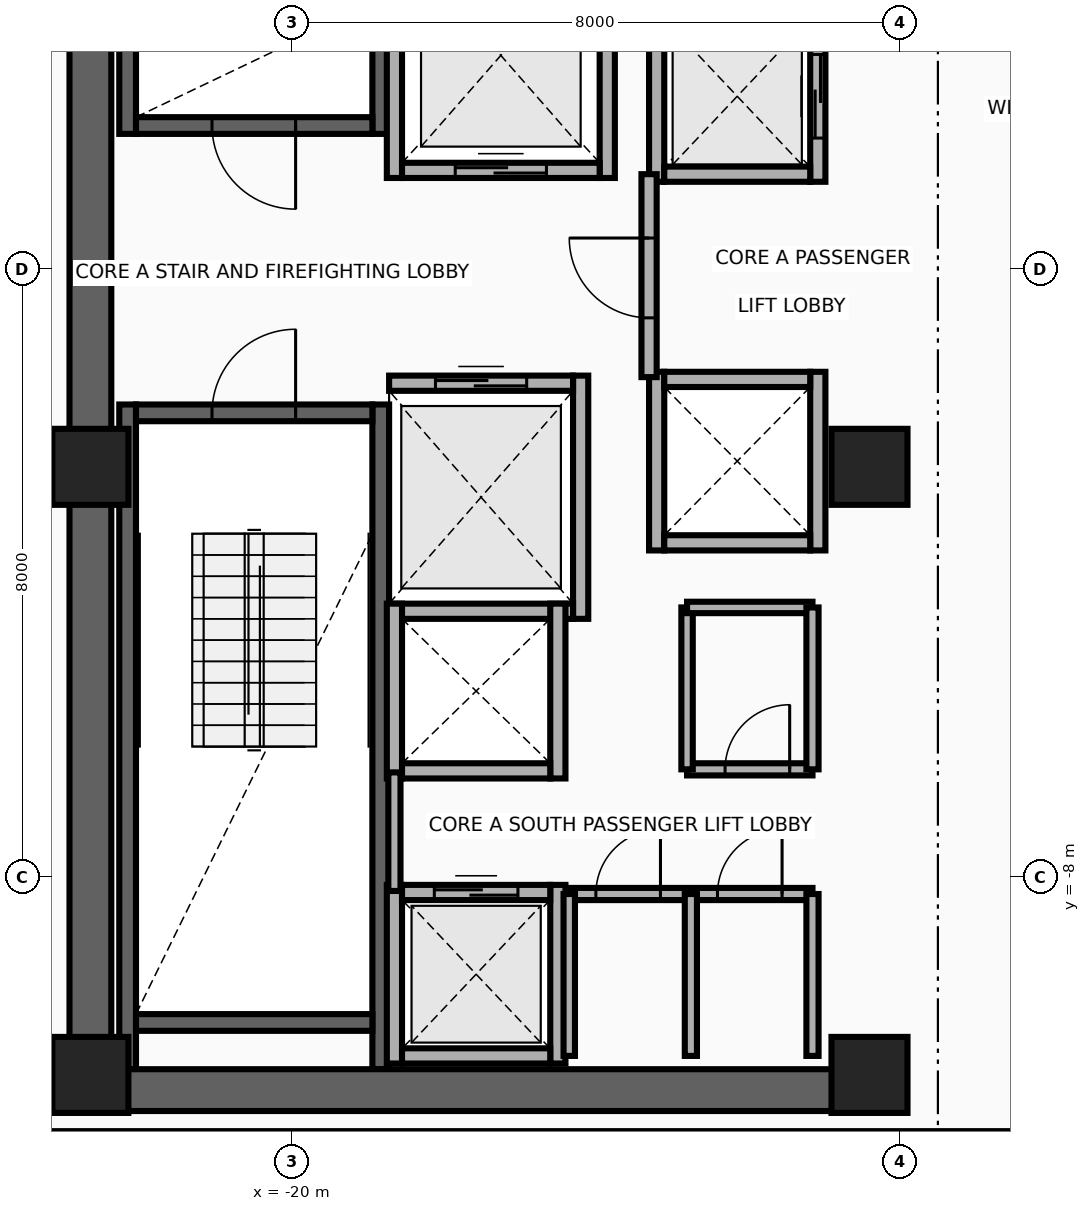
"""IFC4 building model, lengths in metres.
Left out: names, types, materials, properties, quantities, classifications, styles, units other than length and angle.
Written with IfcOpenShell. Run it as: python <this file> out.ifc"""

import sys

from ifc_helpers import new_model, si_unit, direction, frame, frame_2d, origin, origin_2d, place, context, subcontext, project, spatial, rectangle, extrude, source, transform, mapped, element, fill, save


model = new_model("IFC4")
c1 = context("Model", 3, precision=1e-05, world=origin(), true_north=direction((0.0, 1.0)))
c2 = subcontext(c1, "Body", "Model", "MODEL_VIEW")
j1 = project(units=[si_unit("LENGTHUNIT", "METRE"), si_unit("PLANEANGLEUNIT", "RADIAN")], contexts=[c1])
p1 = place(None, origin())
s1 = spatial("IfcSite", under=j1, at=p1, CompositionType="ELEMENT")
p2 = place(p1, origin())
s2 = spatial("IfcBuilding", under=s1, at=p2, CompositionType="ELEMENT")
p3 = place(p2, frame((0.0, 0.0, 184.45)))
s3 = spatial("IfcBuildingStorey", under=s2, at=p3, CompositionType="ELEMENT", Elevation=184.45)
for number, where, z_axis, x_axis in (
    (1, (-22.16, 1.78, 0.0), (0.0, 0.0, 1.0), (0.0, 1.0, 0.0)),
    (2, (-18.83, 1.78, 0.0), (0.0, 0.0, 1.0), (0.0, 1.0, 0.0)),
):
    element("IfcWall", number, at=place(p3, frame(where, z_axis=z_axis, x_axis=x_axis)), inside=s3, PredefinedType="SHEAR", context=c2, shape_type="SweptSolid", body=[
        extrude(rectangle(XDim=8.745, YDim=0.22, at=frame_2d((4.373, 0.0))), origin(), (0.0, 0.0, 1.0), 3.63),
    ])
p4 = place(p3, frame((-22.05, 1.89, 0.0), z_axis=(0.0, 0.0, 1.0), x_axis=(1.0, 0.0, 0.0)))
e3 = element("IfcWall", 3, at=p4, inside=s3, PredefinedType="SHEAR", context=c2, shape_type="SweptSolid", body=[
    extrude(rectangle(XDim=3.11, YDim=0.22, at=frame_2d((1.555, 0.0))), origin(), (0.0, 0.0, 1.0), 3.63),
])
p5 = place(p4, frame((1.0, 0.0, 0.0)))
e4 = element("IfcOpeningElement", 4, at=p5, cuts=e3, PredefinedType="OPENING", context=c2, shape_type="SweptSolid", body=[
    extrude(rectangle(XDim=1.1, YDim=2.15, at=frame_2d((0.55, 1.075))), frame((0.0, 0.125, 0.0), z_axis=(0.0, -1.0, 0.0), x_axis=(1.0, 0.0, 0.0)), (0.0, 0.0, 1.0), 0.25),
])
for number, where, z_axis, x_axis in (
    (5, (-22.16, -10.525, 0.0), (0.0, 0.0, 1.0), (0.0, 1.0, 0.0)),
    (6, (-18.83, -10.525, 0.0), (0.0, 0.0, 1.0), (0.0, 1.0, 0.0)),
):
    element("IfcWall", number, at=place(p3, frame(where, z_axis=z_axis, x_axis=x_axis)), inside=s3, PredefinedType="SHEAR", context=c2, shape_type="SweptSolid", body=[
        extrude(rectangle(XDim=8.745, YDim=0.22, at=frame_2d((4.373, 0.0))), origin(), (0.0, 0.0, 1.0), 3.63),
    ])
p6 = place(p3, frame((-22.05, -9.91, 0.0), z_axis=(0.0, 0.0, 1.0), x_axis=(1.0, 0.0, 0.0)))
e7 = element("IfcWall", 7, at=p6, inside=s3, PredefinedType="SHEAR", context=c2, shape_type="SweptSolid", body=[
    extrude(rectangle(XDim=3.11, YDim=0.22, at=frame_2d((1.555, 0.0))), origin(), (0.0, 0.0, 1.0), 3.63),
])
p7 = place(p3, frame((-22.05, -1.89, 0.0), z_axis=(0.0, 0.0, 1.0), x_axis=(1.0, 0.0, 0.0)))
e8 = element("IfcWall", 8, at=p7, inside=s3, PredefinedType="SHEAR", context=c2, shape_type="SweptSolid", body=[
    extrude(rectangle(XDim=3.11, YDim=0.22, at=frame_2d((1.555, 0.0))), origin(), (0.0, 0.0, 1.0), 3.63),
])
p8 = place(p7, frame((1.0, 0.0, 0.0)))
e9 = element("IfcOpeningElement", 9, at=p8, cuts=e8, PredefinedType="OPENING", context=c2, shape_type="SweptSolid", body=[
    extrude(rectangle(XDim=1.1, YDim=2.15, at=frame_2d((0.55, 1.075))), frame((0.0, 0.125, 0.0), z_axis=(0.0, -1.0, 0.0), x_axis=(1.0, 0.0, 0.0)), (0.0, 0.0, 1.0), 0.25),
])
p9 = place(p3, frame((-22.65, -11.075, 0.0), z_axis=(0.0, 0.0, 1.0), x_axis=(0.0, 1.0, 0.0)))
e10 = element("IfcWall", 10, at=p9, inside=s3, PredefinedType="SHEAR", context=c2, shape_type="SweptSolid", body=[
    extrude(rectangle(XDim=22.15, YDim=0.55, at=frame_2d((11.075, 0.0))), origin(), (0.0, 0.0, 1.0), 3.63),
])
p10 = place(p3, frame((-22.65, -10.8, 0.0), z_axis=(0.0, 0.0, 1.0), x_axis=(1.0, 0.0, 0.0)))
e11 = element("IfcWall", 11, at=p10, inside=s3, PredefinedType="SHEAR", context=c2, shape_type="SweptSolid", body=[
    extrude(rectangle(XDim=10.25, YDim=0.55, at=frame_2d((5.125, 0.0))), origin(), (0.0, 0.0, 1.0), 3.63),
])
m1 = source(origin(), c2, "Body", "SweptSolid", [
    extrude(rectangle(XDim=1.0, YDim=1.0, at=origin_2d()), origin(), (0.0, 0.0, 1.0), 3.95),
])
for number, where, z_axis, x_axis in (
    (12, (-22.65, -10.6, 0.0), (0.0, 0.0, 1.0), (1.0, 0.0, 0.0)),
    (13, (-12.4, -10.6, 0.0), (0.0, 0.0, 1.0), (1.0, 0.0, 0.0)),
    (14, (-22.65, -2.6, 0.0), (0.0, 0.0, 1.0), (1.0, 0.0, 0.0)),
    (15, (-12.4, -2.6, 0.0), (0.0, 0.0, 1.0), (1.0, 0.0, 0.0)),
):
    element("IfcColumn", number, at=place(p3, frame(where, z_axis=z_axis, x_axis=x_axis)), inside=s3, PredefinedType="COLUMN", context=c2, shape_type="MappedRepresentation", body=[
        mapped(m1, transform((0.0, 0.0, 0.0), x_axis=(1.0, 0.0, 0.0), y_axis=(0.0, 1.0, 0.0), z_axis=(0.0, 0.0, 1.0), scale=1.0)),
    ])
for number, where, z_axis, x_axis in (
    (16, (-18.65, 1.2, 0.0), (0.0, 0.0, 1.0), (0.0, 1.0, 0.0)),
    (17, (-15.85, 1.2, 0.0), (0.0, 0.0, 1.0), (0.0, 1.0, 0.0)),
):
    element("IfcWall", number, at=place(p3, frame(where, z_axis=z_axis, x_axis=x_axis)), inside=s3, PredefinedType="MOVABLE", context=c2, shape_type="SweptSolid", body=[
        extrude(rectangle(XDim=3.225, YDim=0.2, at=frame_2d((1.613, 0.0))), origin(), (0.0, 0.0, 1.0), 3.63),
    ])
p11 = place(p3, frame((-18.55, 1.3, 0.0), z_axis=(0.0, 0.0, 1.0), x_axis=(1.0, 0.0, 0.0)))
e18 = element("IfcWall", 18, at=p11, inside=s3, PredefinedType="MOVABLE", context=c2, shape_type="SweptSolid", body=[
    extrude(rectangle(XDim=2.6, YDim=0.2, at=frame_2d((1.3, 0.0))), origin(), (0.0, 0.0, 1.0), 3.63),
])
p12 = place(p11, frame((0.7, 0.0, 0.0)))
e19 = element("IfcOpeningElement", 19, at=p12, cuts=e18, PredefinedType="OPENING", context=c2, shape_type="SweptSolid", body=[
    extrude(rectangle(XDim=1.2, YDim=2.1, at=frame_2d((0.6, 1.05))), frame((0.0, 0.115, 0.0), z_axis=(0.0, -1.0, 0.0), x_axis=(1.0, 0.0, 0.0)), (0.0, 0.0, 1.0), 0.23),
])
p13 = place(p3, frame((-16.2, -4.6, 0.0), z_axis=(0.0, 0.0, 1.0), x_axis=(0.0, 1.0, 0.0)))
e20 = element("IfcWall", 20, at=p13, inside=s3, PredefinedType="MOVABLE", context=c2, shape_type="SweptSolid", body=[
    extrude(rectangle(XDim=3.2, YDim=0.2, at=frame_2d((1.6, 0.0))), origin(), (0.0, 0.0, 1.0), 3.63),
])
p14 = place(p3, frame((-18.72, -4.5, 0.0), z_axis=(0.0, 0.0, 1.0), x_axis=(1.0, 0.0, 0.0)))
e21 = element("IfcWall", 21, at=p14, inside=s3, PredefinedType="MOVABLE", context=c2, shape_type="SweptSolid", body=[
    extrude(rectangle(XDim=2.42, YDim=0.2, at=frame_2d((1.21, 0.0))), origin(), (0.0, 0.0, 1.0), 3.63),
])
p15 = place(p3, frame((-18.72, -1.5, 0.0), z_axis=(0.0, 0.0, 1.0), x_axis=(1.0, 0.0, 0.0)))
e22 = element("IfcWall", 22, at=p15, inside=s3, PredefinedType="MOVABLE", context=c2, shape_type="SweptSolid", body=[
    extrude(rectangle(XDim=2.42, YDim=0.2, at=frame_2d((1.21, 0.0))), origin(), (0.0, 0.0, 1.0), 3.63),
])
p16 = place(p15, frame((0.61, 0.0, 0.0)))
e23 = element("IfcOpeningElement", 23, at=p16, cuts=e22, PredefinedType="OPENING", context=c2, shape_type="SweptSolid", body=[
    extrude(rectangle(XDim=1.2, YDim=2.1, at=frame_2d((0.6, 1.05))), frame((0.0, 0.115, 0.0), z_axis=(0.0, -1.0, 0.0), x_axis=(1.0, 0.0, 0.0)), (0.0, 0.0, 1.0), 0.23),
])
for number, where, z_axis, x_axis in (
    (24, (-18.65, -10.45, 0.0), (0.0, 0.0, 1.0), (0.0, 1.0, 0.0)),
    (25, (-16.5, -10.45, 0.0), (0.0, 0.0, 1.0), (0.0, 1.0, 0.0)),
):
    element("IfcWall", number, at=place(p3, frame(where, z_axis=z_axis, x_axis=x_axis)), inside=s3, PredefinedType="MOVABLE", context=c2, shape_type="SweptSolid", body=[
        extrude(rectangle(XDim=2.35, YDim=0.2, at=frame_2d((1.175, 0.0))), origin(), (0.0, 0.0, 1.0), 2.665),
    ])
p17 = place(p3, frame((-18.55, -10.35, 0.0), z_axis=(0.0, 0.0, 1.0), x_axis=(1.0, 0.0, 0.0)))
e26 = element("IfcWall", 26, at=p17, inside=s3, PredefinedType="MOVABLE", context=c2, shape_type="SweptSolid", body=[
    extrude(rectangle(XDim=1.95, YDim=0.2, at=frame_2d((0.975, 0.0))), origin(), (0.0, 0.0, 1.0), 2.665),
])
p18 = place(p3, frame((-18.55, -8.2, 0.0), z_axis=(0.0, 0.0, 1.0), x_axis=(1.0, 0.0, 0.0)))
e27 = element("IfcWall", 27, at=p18, inside=s3, PredefinedType="MOVABLE", context=c2, shape_type="SweptSolid", body=[
    extrude(rectangle(XDim=1.95, YDim=0.2, at=frame_2d((0.975, 0.0))), origin(), (0.0, 0.0, 1.0), 3.63),
])
p19 = place(p18, frame((0.425, 0.0, 0.0)))
e28 = element("IfcOpeningElement", 28, at=p19, cuts=e27, PredefinedType="OPENING", context=c2, shape_type="SweptSolid", body=[
    extrude(rectangle(XDim=1.1, YDim=2.1, at=frame_2d((0.55, 1.05))), frame((0.0, 0.115, 0.0), z_axis=(0.0, -1.0, 0.0), x_axis=(1.0, 0.0, 0.0)), (0.0, 0.0, 1.0), 0.23),
])
p20 = place(p3, frame((-15.2, 1.15, 0.0), z_axis=(0.0, 0.0, 1.0), x_axis=(0.0, 1.0, 0.0)))
e29 = element("IfcWall", 29, at=p20, inside=s3, PredefinedType="MOVABLE", context=c2, shape_type="SweptSolid", body=[
    extrude(rectangle(XDim=2.25, YDim=0.2, at=frame_2d((1.125, 0.0))), origin(), (0.0, 0.0, 1.0), 3.63),
])
p21 = place(p3, frame((-13.08, 1.15, 0.0), z_axis=(0.0, 0.0, 1.0), x_axis=(0.0, 1.0, 0.0)))
e30 = element("IfcWall", 30, at=p21, inside=s3, PredefinedType="MOVABLE", context=c2, shape_type="SweptSolid", body=[
    extrude(rectangle(XDim=2.25, YDim=0.2, at=frame_2d((1.125, 0.0))), origin(), (0.0, 0.0, 1.0), 3.63),
])
p22 = place(p21, frame((0.575, 0.0, 0.0)))
e31 = element("IfcOpeningElement", 31, at=p22, cuts=e30, PredefinedType="OPENING", context=c2, shape_type="SweptSolid", body=[
    extrude(rectangle(XDim=1.1, YDim=2.1, at=frame_2d((0.55, 1.05))), frame((0.0, 0.115, 0.0), z_axis=(0.0, -1.0, 0.0), x_axis=(1.0, 0.0, 0.0)), (0.0, 0.0, 1.0), 0.23),
])
p23 = place(p3, frame((-15.1, 1.25, 0.0), z_axis=(0.0, 0.0, 1.0), x_axis=(1.0, 0.0, 0.0)))
e32 = element("IfcWall", 32, at=p23, inside=s3, PredefinedType="MOVABLE", context=c2, shape_type="SweptSolid", body=[
    extrude(rectangle(XDim=1.92, YDim=0.2, at=frame_2d((0.96, 0.0))), origin(), (0.0, 0.0, 1.0), 3.63),
])
for number, where, z_axis, x_axis in (
    (33, (-18.65, -6.7, 0.0), (0.0, 0.0, 1.0), (0.0, 1.0, 0.0)),
    (34, (-16.5, -6.7, 0.0), (0.0, 0.0, 1.0), (0.0, 1.0, 0.0)),
):
    element("IfcWall", number, at=place(p3, frame(where, z_axis=z_axis, x_axis=x_axis)), inside=s3, PredefinedType="MOVABLE", context=c2, shape_type="SweptSolid", body=[
        extrude(rectangle(XDim=2.3, YDim=0.2, at=frame_2d((1.15, 0.0))), origin(), (0.0, 0.0, 1.0), 3.63),
    ])
p24 = place(p3, frame((-18.55, -6.6, 0.0), z_axis=(0.0, 0.0, 1.0), x_axis=(1.0, 0.0, 0.0)))
e35 = element("IfcWall", 35, at=p24, inside=s3, PredefinedType="MOVABLE", context=c2, shape_type="SweptSolid", body=[
    extrude(rectangle(XDim=1.95, YDim=0.2, at=frame_2d((0.975, 0.0))), origin(), (0.0, 0.0, 1.0), 3.63),
])
for number, where, z_axis, x_axis in (
    (36, (-15.2, -3.7, 0.0), (0.0, 0.0, 1.0), (0.0, 1.0, 0.0)),
    (37, (-13.08, -3.7, 0.0), (0.0, 0.0, 1.0), (0.0, 1.0, 0.0)),
):
    element("IfcWall", number, at=place(p3, frame(where, z_axis=z_axis, x_axis=x_axis)), inside=s3, PredefinedType="MOVABLE", context=c2, shape_type="SweptSolid", body=[
        extrude(rectangle(XDim=2.35, YDim=0.2, at=frame_2d((1.175, 0.0))), origin(), (0.0, 0.0, 1.0), 3.63),
    ])
for number, where, z_axis, x_axis in (
    (38, (-15.1, -3.6, 0.0), (0.0, 0.0, 1.0), (1.0, 0.0, 0.0)),
    (39, (-15.1, -1.45, 0.0), (0.0, 0.0, 1.0), (1.0, 0.0, 0.0)),
):
    element("IfcWall", number, at=place(p3, frame(where, z_axis=z_axis, x_axis=x_axis)), inside=s3, PredefinedType="MOVABLE", context=c2, shape_type="SweptSolid", body=[
        extrude(rectangle(XDim=1.92, YDim=0.2, at=frame_2d((0.96, 0.0))), origin(), (0.0, 0.0, 1.0), 3.63),
    ])
p25 = place(p3, frame((-15.3, -1.42, 0.0), z_axis=(0.0, 0.0, 1.0), x_axis=(0.0, 1.0, 0.0)))
e40 = element("IfcWall", 40, at=p25, inside=s3, PredefinedType="PARTITIONING", context=c2, shape_type="SweptSolid", body=[
    extrude(rectangle(XDim=2.67, YDim=0.2, at=frame_2d((1.335, 0.0))), origin(), (0.0, 0.0, 1.0), 3.63),
])
p26 = place(p25, frame((0.78, 0.0, 0.0)))
e41 = element("IfcOpeningElement", 41, at=p26, cuts=e40, PredefinedType="OPENING", context=c2, shape_type="SweptSolid", body=[
    extrude(rectangle(XDim=1.05, YDim=2.15, at=frame_2d((0.525, 1.075))), frame((0.0, 0.115, 0.0), z_axis=(0.0, -1.0, 0.0), x_axis=(1.0, 0.0, 0.0)), (0.0, 0.0, 1.0), 0.23),
])
p27 = place(p3, frame((-18.65, -8.18, 0.0), z_axis=(0.0, 0.0, 1.0), x_axis=(0.0, 1.0, 0.0)))
e42 = element("IfcWall", 42, at=p27, inside=s3, PredefinedType="PARTITIONING", context=c2, shape_type="SweptSolid", body=[
    extrude(rectangle(XDim=1.56, YDim=0.16, at=frame_2d((0.78, 0.0))), origin(), (0.0, 0.0, 1.0), 3.63),
])
p28 = place(p3, frame((-16.35, -8.22, 0.0), z_axis=(0.0, 0.0, 1.0), x_axis=(1.0, 0.0, 0.0)))
e43 = element("IfcWall", 43, at=p28, inside=s3, PredefinedType="PARTITIONING", context=c2, shape_type="SweptSolid", body=[
    extrude(rectangle(XDim=3.2, YDim=0.16, at=frame_2d((1.6, 0.0))), origin(), (0.0, 0.0, 1.0), 3.63),
])
p29 = place(p28, frame((0.35, 0.0, 0.0)))
e44 = element("IfcOpeningElement", 44, at=p29, cuts=e43, PredefinedType="OPENING", context=c2, shape_type="SweptSolid", body=[
    extrude(rectangle(XDim=0.85, YDim=2.05, at=frame_2d((0.425, 1.025))), frame((0.0, 0.095, 0.0), z_axis=(0.0, -1.0, 0.0), x_axis=(1.0, 0.0, 0.0)), (0.0, 0.0, 1.0), 0.19),
])
p30 = place(p28, frame((1.95, 0.0, 0.0)))
e45 = element("IfcOpeningElement", 45, at=p30, cuts=e43, PredefinedType="OPENING", context=c2, shape_type="SweptSolid", body=[
    extrude(rectangle(XDim=0.85, YDim=2.05, at=frame_2d((0.425, 1.025))), frame((0.0, 0.095, 0.0), z_axis=(0.0, -1.0, 0.0), x_axis=(1.0, 0.0, 0.0)), (0.0, 0.0, 1.0), 0.19),
])
p31 = place(p3, frame((-16.35, -10.35, 0.0), z_axis=(0.0, 0.0, 1.0), x_axis=(0.0, 1.0, 0.0)))
e46 = element("IfcWall", 46, at=p31, inside=s3, PredefinedType="PARTITIONING", context=c2, shape_type="SweptSolid", body=[
    extrude(rectangle(XDim=2.13, YDim=0.15, at=frame_2d((1.065, 0.0))), origin(), (0.0, 0.0, 1.0), 3.63),
])
for number, where, z_axis, x_axis in (
    (47, (-13.15, -10.35, 0.0), (0.0, 0.0, 1.0), (0.0, 1.0, 0.0)),
    (48, (-14.75, -10.35, 0.0), (0.0, 0.0, 1.0), (0.0, 1.0, 0.0)),
):
    element("IfcWall", number, at=place(p3, frame(where, z_axis=z_axis, x_axis=x_axis)), inside=s3, PredefinedType="PARTITIONING", context=c2, shape_type="SweptSolid", body=[
        extrude(rectangle(XDim=2.13, YDim=0.16, at=frame_2d((1.065, 0.0))), origin(), (0.0, 0.0, 1.0), 3.63),
    ])
p32 = place(p3, frame((-14.8, -6.58, 0.0), z_axis=(0.0, 0.0, 1.0), x_axis=(1.0, 0.0, 0.0)))
e49 = element("IfcWall", 49, at=p32, inside=s3, PredefinedType="PARTITIONING", context=c2, shape_type="SweptSolid", body=[
    extrude(rectangle(XDim=1.65, YDim=0.16, at=frame_2d((0.825, 0.0))), origin(), (0.0, 0.0, 1.0), 3.63),
])
p33 = place(p32, frame((0.5, 0.0, 0.0)))
e50 = element("IfcOpeningElement", 50, at=p33, cuts=e49, PredefinedType="OPENING", context=c2, shape_type="SweptSolid", body=[
    extrude(rectangle(XDim=0.85, YDim=2.05, at=frame_2d((0.425, 1.025))), frame((0.0, 0.095, 0.0), z_axis=(0.0, -1.0, 0.0), x_axis=(1.0, 0.0, 0.0)), (0.0, 0.0, 1.0), 0.19),
])
p34 = place(p3, frame((-14.8, -6.58, 0.0), z_axis=(0.0, 0.0, 1.0), x_axis=(0.0, 1.0, 0.0)))
e51 = element("IfcWall", 51, at=p34, inside=s3, PredefinedType="PARTITIONING", context=c2, shape_type="SweptSolid", body=[
    extrude(rectangle(XDim=2.13, YDim=0.15, at=frame_2d((1.065, 0.0))), origin(), (0.0, 0.0, 1.0), 3.63),
])
p35 = place(p3, frame((-14.8, -4.45, 0.0), z_axis=(0.0, 0.0, 1.0), x_axis=(1.0, 0.0, 0.0)))
e52 = element("IfcWall", 52, at=p35, inside=s3, PredefinedType="PARTITIONING", context=c2, shape_type="SweptSolid", body=[
    extrude(rectangle(XDim=1.65, YDim=0.15, at=frame_2d((0.825, 0.0))), origin(), (0.0, 0.0, 1.0), 3.63),
])
p36 = place(p3, frame((-13.15, -6.58, 0.0), z_axis=(0.0, 0.0, 1.0), x_axis=(0.0, 1.0, 0.0)))
e53 = element("IfcWall", 53, at=p36, inside=s3, PredefinedType="PARTITIONING", context=c2, shape_type="SweptSolid", body=[
    extrude(rectangle(XDim=2.13, YDim=0.16, at=frame_2d((1.065, 0.0))), origin(), (0.0, 0.0, 1.0), 3.63),
])
p37 = place(p3, frame((-23.45, -11.42, 0.0), z_axis=(0.0, 0.0, 1.0), x_axis=(1.0, 0.0, 0.0)))
e54 = element("IfcWall", 54, at=p37, inside=s3, PredefinedType="PARTITIONING", context=c2, shape_type="SweptSolid", body=[
    extrude(rectangle(XDim=13.84, YDim=0.16, at=frame_2d((6.92, 0.0))), origin(), (0.0, 0.0, 1.0), 3.004),
])
p38 = place(p12, origin())
e55 = element("IfcDoor", 55, at=p38, inside=s3, OperationType="DOUBLE_DOOR_SLIDING", PredefinedType="DOOR", context=c2, shape_type="SweptSolid", body=[
    extrude(rectangle(XDim=1.2, YDim=2.1, at=frame_2d((0.6, 1.05))), frame((0.0, 0.025, 0.0), z_axis=(0.0, -1.0, 0.0), x_axis=(1.0, 0.0, 0.0)), (0.0, 0.0, 1.0), 0.05),
])
fill(e19, e55)
p39 = place(p16, origin())
e56 = element("IfcDoor", 56, at=p39, inside=s3, OperationType="DOUBLE_DOOR_SLIDING", PredefinedType="DOOR", context=c2, shape_type="SweptSolid", body=[
    extrude(rectangle(XDim=1.2, YDim=2.1, at=frame_2d((0.6, 1.05))), frame((0.0, 0.025, 0.0), z_axis=(0.0, -1.0, 0.0), x_axis=(1.0, 0.0, 0.0)), (0.0, 0.0, 1.0), 0.05),
])
fill(e23, e56)
p40 = place(p19, origin())
e57 = element("IfcDoor", 57, at=p40, inside=s3, OperationType="DOUBLE_DOOR_SLIDING", PredefinedType="DOOR", context=c2, shape_type="SweptSolid", body=[
    extrude(rectangle(XDim=1.1, YDim=2.1, at=frame_2d((0.55, 1.05))), frame((0.0, 0.025, 0.0), z_axis=(0.0, -1.0, 0.0), x_axis=(1.0, 0.0, 0.0)), (0.0, 0.0, 1.0), 0.05),
])
fill(e28, e57)
p41 = place(p22, origin())
e58 = element("IfcDoor", 58, at=p41, inside=s3, OperationType="DOUBLE_DOOR_SLIDING", PredefinedType="DOOR", context=c2, shape_type="SweptSolid", body=[
    extrude(rectangle(XDim=1.1, YDim=2.1, at=frame_2d((0.55, 1.05))), frame((0.0, 0.025, 0.0), z_axis=(0.0, -1.0, 0.0), x_axis=(1.0, 0.0, 0.0)), (0.0, 0.0, 1.0), 0.05),
])
fill(e31, e58)
p42 = place(p26, origin())
e59 = element("IfcDoor", 59, at=p42, inside=s3, OperationType="SINGLE_SWING_RIGHT", PredefinedType="DOOR", context=c2, shape_type="SweptSolid", body=[
    extrude(rectangle(XDim=1.05, YDim=2.15, at=frame_2d((0.525, 1.075))), frame((0.0, 0.025, 0.0), z_axis=(0.0, -1.0, 0.0), x_axis=(1.0, 0.0, 0.0)), (0.0, 0.0, 1.0), 0.05),
])
fill(e41, e59)
p43 = place(p5, frame((1.1, 0.0, 0.0), z_axis=(0.0, 0.0, 1.0), x_axis=(-1.0, 0.0, 0.0)))
e60 = element("IfcDoor", 60, at=p43, inside=s3, OperationType="SINGLE_SWING_LEFT", PredefinedType="DOOR", context=c2, shape_type="SweptSolid", body=[
    extrude(rectangle(XDim=1.1, YDim=2.15, at=frame_2d((0.55, 1.075))), frame((0.0, 0.025, 0.0), z_axis=(0.0, -1.0, 0.0), x_axis=(1.0, 0.0, 0.0)), (0.0, 0.0, 1.0), 0.05),
])
fill(e4, e60)
p44 = place(p8, origin())
e61 = element("IfcDoor", 61, at=p44, inside=s3, OperationType="SINGLE_SWING_RIGHT", PredefinedType="DOOR", context=c2, shape_type="SweptSolid", body=[
    extrude(rectangle(XDim=1.1, YDim=2.15, at=frame_2d((0.55, 1.075))), frame((0.0, 0.025, 0.0), z_axis=(0.0, -1.0, 0.0), x_axis=(1.0, 0.0, 0.0)), (0.0, 0.0, 1.0), 0.05),
])
fill(e9, e61)
p45 = place(p29, origin())
e62 = element("IfcDoor", 62, at=p45, inside=s3, OperationType="SINGLE_SWING_LEFT", PredefinedType="DOOR", context=c2, shape_type="SweptSolid", body=[
    extrude(rectangle(XDim=0.85, YDim=2.05, at=frame_2d((0.425, 1.025))), frame((0.0, 0.025, 0.0), z_axis=(0.0, -1.0, 0.0), x_axis=(1.0, 0.0, 0.0)), (0.0, 0.0, 1.0), 0.05),
])
fill(e44, e62)
p46 = place(p30, origin())
e63 = element("IfcDoor", 63, at=p46, inside=s3, OperationType="SINGLE_SWING_RIGHT", PredefinedType="DOOR", context=c2, shape_type="SweptSolid", body=[
    extrude(rectangle(XDim=0.85, YDim=2.05, at=frame_2d((0.425, 1.025))), frame((0.0, 0.025, 0.0), z_axis=(0.0, -1.0, 0.0), x_axis=(1.0, 0.0, 0.0)), (0.0, 0.0, 1.0), 0.05),
])
fill(e45, e63)
p47 = place(p33, origin())
e64 = element("IfcDoor", 64, at=p47, inside=s3, OperationType="SINGLE_SWING_LEFT", PredefinedType="DOOR", context=c2, shape_type="SweptSolid", body=[
    extrude(rectangle(XDim=0.85, YDim=2.05, at=frame_2d((0.425, 1.025))), frame((0.0, 0.025, 0.0), z_axis=(0.0, -1.0, 0.0), x_axis=(1.0, 0.0, 0.0)), (0.0, 0.0, 1.0), 0.05),
])
fill(e50, e64)
save(model, sys.argv[1])
